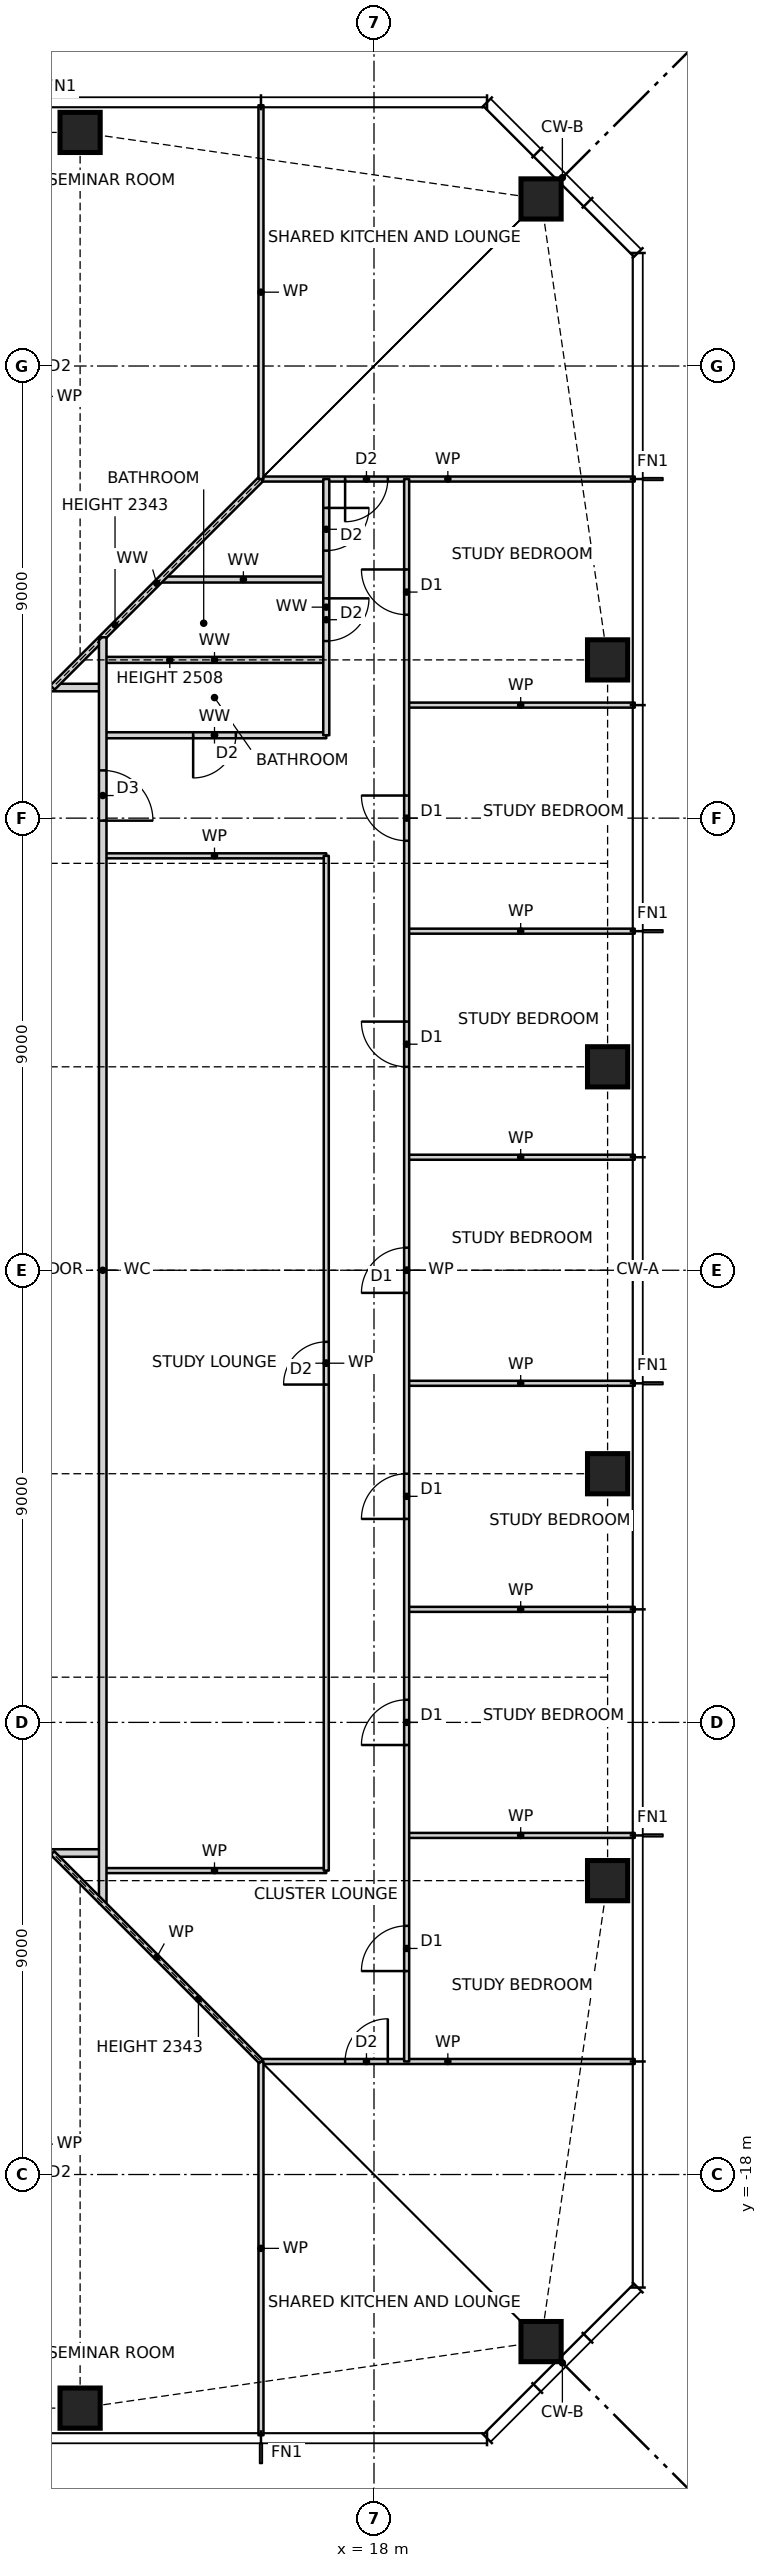
"""IFC4 building model, lengths in metres.
Left out: names, types, materials, properties, quantities, classifications, styles, units other than length and angle.
Written with IfcOpenShell. Run it as: python <this file> out.ifc"""

import sys

from ifc_helpers import new_model, si_unit, direction, frame, frame_2d, origin, origin_2d, place, context, subcontext, project, spatial, rectangle, hollow_rectangle, extrude, element, fill, save


model = new_model("IFC4")
c1 = context("Model", 3, precision=1e-05, world=origin(), true_north=direction((0.0, 1.0)))
c2 = subcontext(c1, "Body", "Model", "MODEL_VIEW")
j1 = project(units=[si_unit("LENGTHUNIT", "METRE"), si_unit("PLANEANGLEUNIT", "RADIAN")], contexts=[c1])
p1 = place(None, origin())
s1 = spatial("IfcSite", under=j1, at=p1, CompositionType="ELEMENT")
p2 = place(p1, origin())
s2 = spatial("IfcBuilding", under=s1, at=p2, CompositionType="ELEMENT")
p3 = place(p2, frame((0.0, 0.0, 29.0)))
s3 = spatial("IfcBuildingStorey", under=s2, at=p3, CompositionType="ELEMENT", Elevation=29.0)
for number, where, z_axis, x_axis in (
    (1, (12.15, -22.65, 0.0), (0.0, 0.0, 1.0), (1.0, 0.0, 0.0)),
    (2, (21.326, -21.326, 0.0), (0.0, 0.0, 1.0), (1.0, 0.0, 0.0)),
    (3, (22.65, -12.15, 0.0), (0.0, 0.0, 1.0), (1.0, 0.0, 0.0)),
    (4, (22.65, -4.05, 0.0), (0.0, 0.0, 1.0), (1.0, 0.0, 0.0)),
    (5, (22.65, 4.05, 0.0), (0.0, 0.0, 1.0), (1.0, 0.0, 0.0)),
    (6, (22.65, 12.15, 0.0), (0.0, 0.0, 1.0), (1.0, 0.0, 0.0)),
    (7, (21.326, 21.326, 0.0), (0.0, 0.0, 1.0), (1.0, 0.0, 0.0)),
    (8, (12.15, 22.65, 0.0), (0.0, 0.0, 1.0), (1.0, 0.0, 0.0)),
):
    element("IfcColumn", number, at=place(p3, frame(where, z_axis=z_axis, x_axis=x_axis)), inside=s3, PredefinedType="COLUMN", context=c2, shape_type="SweptSolid", body=[
        extrude(hollow_rectangle(XDim=0.8, YDim=0.8, WallThickness=0.09, at=origin_2d()), origin(), (0.0, 0.0, 1.0), 3.5),
    ])
p4 = place(p3, frame((15.75, -15.75, 0.0), z_axis=(0.0, 0.0, 1.0), x_axis=(1.0, 0.0, 0.0)))
e9 = element("IfcWall", 9, at=p4, inside=s3, PredefinedType="PARTITIONING", context=c2, shape_type="SweptSolid", body=[
    extrude(rectangle(XDim=7.44, YDim=0.1, at=frame_2d((3.72, 0.0))), origin(), (0.0, 0.0, 1.0), 3.27),
])
p5 = place(p4, frame((1.675, 0.0, 0.0)))
e10 = element("IfcOpeningElement", 10, at=p5, cuts=e9, PredefinedType="OPENING", context=c2, shape_type="SweptSolid", body=[
    extrude(rectangle(XDim=0.85, YDim=2.1, at=frame_2d((0.425, 1.05))), frame((0.0, 0.06, 0.0), z_axis=(0.0, -1.0, 0.0), x_axis=(1.0, 0.0, 0.0)), (0.0, 0.0, 1.0), 0.12),
])
p6 = place(p3, frame((12.6, -11.95, 0.0), z_axis=(0.0, 0.0, 1.0), x_axis=(1.0, 0.0, 0.0)))
e11 = element("IfcWall", 11, at=p6, inside=s3, PredefinedType="PARTITIONING", context=c2, shape_type="SweptSolid", body=[
    extrude(rectangle(XDim=4.45, YDim=0.1, at=frame_2d((2.225, 0.0))), origin(), (0.0, 0.0, 1.0), 3.27),
])
p7 = place(p3, frame((-11.6, -11.6, 0.0), z_axis=(0.0, 0.0, 1.0), x_axis=(1.0, 0.0, 0.0)))
e12 = element("IfcWall", 12, at=p7, inside=s3, PredefinedType="PARTITIONING", context=c2, shape_type="SweptSolid", body=[
    extrude(rectangle(XDim=24.2, YDim=0.15, at=frame_2d((12.1, 0.0))), origin(), (0.0, 0.0, 1.0), 3.27),
])
p8 = place(p7, frame((16.05, 0.0, 0.0)))
e13 = element("IfcOpeningElement", 13, at=p8, cuts=e12, PredefinedType="OPENING", context=c2, shape_type="SweptSolid", body=[
    extrude(rectangle(XDim=1.0, YDim=2.1, at=frame_2d((0.5, 1.05))), frame((0.0, 0.085, 0.0), z_axis=(0.0, -1.0, 0.0), x_axis=(1.0, 0.0, 0.0)), (0.0, 0.0, 1.0), 0.17),
])
for number, where, z_axis, x_axis in (
    (14, (18.65, -11.25, 0.0), (0.0, 0.0, 1.0), (1.0, 0.0, 0.0)),
    (15, (18.65, -6.75, 0.0), (0.0, 0.0, 1.0), (1.0, 0.0, 0.0)),
    (16, (18.65, -2.25, 0.0), (0.0, 0.0, 1.0), (1.0, 0.0, 0.0)),
    (17, (18.65, 2.25, 0.0), (0.0, 0.0, 1.0), (1.0, 0.0, 0.0)),
    (18, (18.65, 6.75, 0.0), (0.0, 0.0, 1.0), (1.0, 0.0, 0.0)),
):
    element("IfcWall", number, at=place(p3, frame(where, z_axis=z_axis, x_axis=x_axis)), inside=s3, PredefinedType="PARTITIONING", context=c2, shape_type="SweptSolid", body=[
        extrude(rectangle(XDim=4.54, YDim=0.1, at=frame_2d((2.27, 0.0))), origin(), (0.0, 0.0, 1.0), 3.27),
    ])
p9 = place(p3, frame((12.6, 8.25, 0.0), z_axis=(0.0, 0.0, 1.0), x_axis=(1.0, 0.0, 0.0)))
e19 = element("IfcWall", 19, at=p9, inside=s3, PredefinedType="PARTITIONING", context=c2, shape_type="SweptSolid", body=[
    extrude(rectangle(XDim=4.45, YDim=0.1, at=frame_2d((2.225, 0.0))), origin(), (0.0, 0.0, 1.0), 3.27),
])
p10 = place(p3, frame((12.6, 10.65, 0.0), z_axis=(0.0, 0.0, 1.0), x_axis=(1.0, 0.0, 0.0)))
e20 = element("IfcWall", 20, at=p10, inside=s3, PredefinedType="PARTITIONING", context=c2, shape_type="SweptSolid", body=[
    extrude(rectangle(XDim=4.45, YDim=0.12, at=frame_2d((2.225, 0.0))), origin(), (0.0, 0.0, 1.0), 3.27),
])
p11 = place(p10, frame((1.8, 0.0, 0.0)))
e21 = element("IfcOpeningElement", 21, at=p11, cuts=e20, PredefinedType="OPENING", context=c2, shape_type="SweptSolid", body=[
    extrude(rectangle(XDim=0.85, YDim=2.1, at=frame_2d((0.425, 1.05))), frame((0.0, 0.07, 0.0), z_axis=(0.0, -1.0, 0.0), x_axis=(1.0, 0.0, 0.0)), (0.0, 0.0, 1.0), 0.14),
])
p12 = place(p3, frame((18.65, 11.25, 0.0), z_axis=(0.0, 0.0, 1.0), x_axis=(1.0, 0.0, 0.0)))
e22 = element("IfcWall", 22, at=p12, inside=s3, PredefinedType="PARTITIONING", context=c2, shape_type="SweptSolid", body=[
    extrude(rectangle(XDim=4.54, YDim=0.1, at=frame_2d((2.27, 0.0))), origin(), (0.0, 0.0, 1.0), 3.27),
])
p13 = place(p3, frame((-11.6, 11.6, 0.0), z_axis=(0.0, 0.0, 1.0), x_axis=(1.0, 0.0, 0.0)))
e23 = element("IfcWall", 23, at=p13, inside=s3, PredefinedType="PARTITIONING", context=c2, shape_type="SweptSolid", body=[
    extrude(rectangle(XDim=24.2, YDim=0.15, at=frame_2d((12.1, 0.0))), origin(), (0.0, 0.0, 1.0), 3.27),
])
p14 = place(p13, frame((12.855, 0.0, 0.0)))
e24 = element("IfcOpeningElement", 24, at=p14, cuts=e23, PredefinedType="OPENING", context=c2, shape_type="SweptSolid", body=[
    extrude(rectangle(XDim=1.0, YDim=2.1, at=frame_2d((0.5, 1.05))), frame((0.0, 0.085, 0.0), z_axis=(0.0, -1.0, 0.0), x_axis=(1.0, 0.0, 0.0)), (0.0, 0.0, 1.0), 0.17),
])
p15 = place(p3, frame((12.6, 12.15, 0.0), z_axis=(0.0, 0.0, 1.0), x_axis=(1.0, 0.0, 0.0)))
e25 = element("IfcWall", 25, at=p15, inside=s3, PredefinedType="PARTITIONING", context=c2, shape_type="SweptSolid", body=[
    extrude(rectangle(XDim=4.45, YDim=0.12, at=frame_2d((2.225, 0.0))), origin(), (0.0, 0.0, 1.0), 2.508),
])
p16 = place(p3, frame((13.75, 13.75, 0.0), z_axis=(0.0, 0.0, 1.0), x_axis=(1.0, 0.0, 0.0)))
e26 = element("IfcWall", 26, at=p16, inside=s3, PredefinedType="PARTITIONING", context=c2, shape_type="SweptSolid", body=[
    extrude(rectangle(XDim=3.3, YDim=0.12, at=frame_2d((1.65, 0.0))), origin(), (0.0, 0.0, 1.0), 3.27),
])
p17 = place(p3, frame((15.75, 15.75, 0.0), z_axis=(0.0, 0.0, 1.0), x_axis=(1.0, 0.0, 0.0)))
e27 = element("IfcWall", 27, at=p17, inside=s3, PredefinedType="PARTITIONING", context=c2, shape_type="SweptSolid", body=[
    extrude(rectangle(XDim=7.44, YDim=0.1, at=frame_2d((3.72, 0.0))), origin(), (0.0, 0.0, 1.0), 3.27),
])
p18 = place(p17, frame((1.675, 0.0, 0.0)))
e28 = element("IfcOpeningElement", 28, at=p18, cuts=e27, PredefinedType="OPENING", context=c2, shape_type="SweptSolid", body=[
    extrude(rectangle(XDim=0.85, YDim=2.1, at=frame_2d((0.425, 1.05))), frame((0.0, 0.06, 0.0), z_axis=(0.0, -1.0, 0.0), x_axis=(1.0, 0.0, 0.0)), (0.0, 0.0, 1.0), 0.12),
])
p19 = place(p3, frame((11.6, 11.6, 0.0), z_axis=(0.0, 0.0, 1.0), x_axis=(0.707106781187, 0.707106781187, 0.0)))
e29 = element("IfcWall", 29, at=p19, inside=s3, PredefinedType="PARTITIONING", context=c2, shape_type="SweptSolid", body=[
    extrude(rectangle(XDim=5.869, YDim=0.12, at=frame_2d((2.935, 0.0))), origin(), (0.0, 0.0, 1.0), 2.343),
])
p20 = place(p3, frame((18.65, -15.75, 0.0), z_axis=(0.0, 0.0, 1.0), x_axis=(0.0, 1.0, 0.0)))
e30 = element("IfcWall", 30, at=p20, inside=s3, PredefinedType="PARTITIONING", context=c2, shape_type="SweptSolid", body=[
    extrude(rectangle(XDim=31.5, YDim=0.1, at=frame_2d((15.75, 0.0))), origin(), (0.0, 0.0, 1.0), 3.27),
])
p21 = place(p20, frame((1.8, 0.0, 0.0)))
e31 = element("IfcOpeningElement", 31, at=p21, cuts=e30, PredefinedType="OPENING", context=c2, shape_type="SweptSolid", body=[
    extrude(rectangle(XDim=0.9, YDim=2.1, at=frame_2d((0.45, 1.05))), frame((0.0, 0.06, 0.0), z_axis=(0.0, -1.0, 0.0), x_axis=(1.0, 0.0, 0.0)), (0.0, 0.0, 1.0), 0.12),
])
p22 = place(p20, frame((6.3, 0.0, 0.0)))
e32 = element("IfcOpeningElement", 32, at=p22, cuts=e30, PredefinedType="OPENING", context=c2, shape_type="SweptSolid", body=[
    extrude(rectangle(XDim=0.9, YDim=2.1, at=frame_2d((0.45, 1.05))), frame((0.0, 0.06, 0.0), z_axis=(0.0, -1.0, 0.0), x_axis=(1.0, 0.0, 0.0)), (0.0, 0.0, 1.0), 0.12),
])
p23 = place(p20, frame((10.8, 0.0, 0.0)))
e33 = element("IfcOpeningElement", 33, at=p23, cuts=e30, PredefinedType="OPENING", context=c2, shape_type="SweptSolid", body=[
    extrude(rectangle(XDim=0.9, YDim=2.1, at=frame_2d((0.45, 1.05))), frame((0.0, 0.06, 0.0), z_axis=(0.0, -1.0, 0.0), x_axis=(1.0, 0.0, 0.0)), (0.0, 0.0, 1.0), 0.12),
])
p24 = place(p20, frame((15.3, 0.0, 0.0)))
e34 = element("IfcOpeningElement", 34, at=p24, cuts=e30, PredefinedType="OPENING", context=c2, shape_type="SweptSolid", body=[
    extrude(rectangle(XDim=0.9, YDim=2.1, at=frame_2d((0.45, 1.05))), frame((0.0, 0.06, 0.0), z_axis=(0.0, -1.0, 0.0), x_axis=(1.0, 0.0, 0.0)), (0.0, 0.0, 1.0), 0.12),
])
p25 = place(p20, frame((19.8, 0.0, 0.0)))
e35 = element("IfcOpeningElement", 35, at=p25, cuts=e30, PredefinedType="OPENING", context=c2, shape_type="SweptSolid", body=[
    extrude(rectangle(XDim=0.9, YDim=2.1, at=frame_2d((0.45, 1.05))), frame((0.0, 0.06, 0.0), z_axis=(0.0, -1.0, 0.0), x_axis=(1.0, 0.0, 0.0)), (0.0, 0.0, 1.0), 0.12),
])
p26 = place(p20, frame((24.3, 0.0, 0.0)))
e36 = element("IfcOpeningElement", 36, at=p26, cuts=e30, PredefinedType="OPENING", context=c2, shape_type="SweptSolid", body=[
    extrude(rectangle(XDim=0.9, YDim=2.1, at=frame_2d((0.45, 1.05))), frame((0.0, 0.06, 0.0), z_axis=(0.0, -1.0, 0.0), x_axis=(1.0, 0.0, 0.0)), (0.0, 0.0, 1.0), 0.12),
])
p27 = place(p20, frame((28.8, 0.0, 0.0)))
e37 = element("IfcOpeningElement", 37, at=p27, cuts=e30, PredefinedType="OPENING", context=c2, shape_type="SweptSolid", body=[
    extrude(rectangle(XDim=0.9, YDim=2.1, at=frame_2d((0.45, 1.05))), frame((0.0, 0.06, 0.0), z_axis=(0.0, -1.0, 0.0), x_axis=(1.0, 0.0, 0.0)), (0.0, 0.0, 1.0), 0.12),
])
p28 = place(p3, frame((17.05, -11.95, 0.0), z_axis=(0.0, 0.0, 1.0), x_axis=(0.0, 1.0, 0.0)))
e38 = element("IfcWall", 38, at=p28, inside=s3, PredefinedType="PARTITIONING", context=c2, shape_type="SweptSolid", body=[
    extrude(rectangle(XDim=20.2, YDim=0.1, at=frame_2d((10.1, 0.0))), origin(), (0.0, 0.0, 1.0), 3.27),
])
p29 = place(p28, frame((9.675, 0.0, 0.0)))
e39 = element("IfcOpeningElement", 39, at=p29, cuts=e38, PredefinedType="OPENING", context=c2, shape_type="SweptSolid", body=[
    extrude(rectangle(XDim=0.85, YDim=2.1, at=frame_2d((0.425, 1.05))), frame((0.0, 0.06, 0.0), z_axis=(0.0, -1.0, 0.0), x_axis=(1.0, 0.0, 0.0)), (0.0, 0.0, 1.0), 0.12),
])
p30 = place(p3, frame((17.05, 10.65, 0.0), z_axis=(0.0, 0.0, 1.0), x_axis=(0.0, 1.0, 0.0)))
e40 = element("IfcWall", 40, at=p30, inside=s3, PredefinedType="PARTITIONING", context=c2, shape_type="SweptSolid", body=[
    extrude(rectangle(XDim=5.1, YDim=0.12, at=frame_2d((2.55, 0.0))), origin(), (0.0, 0.0, 1.0), 3.27),
])
p31 = place(p30, frame((1.875, 0.0, 0.0)))
e41 = element("IfcOpeningElement", 41, at=p31, cuts=e40, PredefinedType="OPENING", context=c2, shape_type="SweptSolid", body=[
    extrude(rectangle(XDim=0.85, YDim=2.1, at=frame_2d((0.425, 1.05))), frame((0.0, 0.07, 0.0), z_axis=(0.0, -1.0, 0.0), x_axis=(1.0, 0.0, 0.0)), (0.0, 0.0, 1.0), 0.14),
])
p32 = place(p30, frame((3.675, 0.0, 0.0)))
e42 = element("IfcOpeningElement", 42, at=p32, cuts=e40, PredefinedType="OPENING", context=c2, shape_type="SweptSolid", body=[
    extrude(rectangle(XDim=0.85, YDim=2.1, at=frame_2d((0.425, 1.05))), frame((0.0, 0.07, 0.0), z_axis=(0.0, -1.0, 0.0), x_axis=(1.0, 0.0, 0.0)), (0.0, 0.0, 1.0), 0.14),
])
for number, where, z_axis, x_axis in (
    (43, (15.75, -23.19, 0.0), (0.0, 0.0, 1.0), (0.0, 1.0, 0.0)),
    (44, (15.75, 15.75, 0.0), (0.0, 0.0, 1.0), (0.0, 1.0, 0.0)),
):
    element("IfcWall", number, at=place(p3, frame(where, z_axis=z_axis, x_axis=x_axis)), inside=s3, PredefinedType="PARTITIONING", context=c2, shape_type="SweptSolid", body=[
        extrude(rectangle(XDim=7.44, YDim=0.1, at=frame_2d((3.72, 0.0))), origin(), (0.0, 0.0, 1.0), 3.27),
    ])
p33 = place(p3, frame((12.6, -12.6, 0.0), z_axis=(0.0, 0.0, 1.0), x_axis=(0.0, 1.0, 0.0)))
e45 = element("IfcWall", 45, at=p33, inside=s3, PredefinedType="PARTITIONING", context=c2, shape_type="SweptSolid", body=[
    extrude(rectangle(XDim=25.2, YDim=0.15, at=frame_2d((12.6, 0.0))), origin(), (0.0, 0.0, 1.0), 3.27),
])
p34 = place(p33, frame((21.55, 0.0, 0.0)))
e46 = element("IfcOpeningElement", 46, at=p34, cuts=e45, PredefinedType="OPENING", context=c2, shape_type="SweptSolid", body=[
    extrude(rectangle(XDim=1.0, YDim=2.1, at=frame_2d((0.5, 1.05))), frame((0.0, 0.085, 0.0), z_axis=(0.0, -1.0, 0.0), x_axis=(1.0, 0.0, 0.0)), (0.0, 0.0, 1.0), 0.17),
])
p35 = place(p3, frame((15.75, -15.75, 0.0), z_axis=(0.0, 0.0, 1.0), x_axis=(-0.707106781187, 0.707106781187, 0.0)))
e47 = element("IfcWall", 47, at=p35, inside=s3, PredefinedType="PARTITIONING", context=c2, shape_type="SweptSolid", body=[
    extrude(rectangle(XDim=5.869, YDim=0.1, at=frame_2d((2.935, 0.0))), origin(), (0.0, 0.0, 1.0), 2.343),
])
p36 = place(p21, origin())
e48 = element("IfcDoor", 48, at=p36, inside=s3, OperationType="SINGLE_SWING_LEFT", PredefinedType="DOOR", context=c2, shape_type="SweptSolid", body=[
    extrude(rectangle(XDim=0.9, YDim=2.1, at=frame_2d((0.45, 1.05))), frame((0.0, 0.025, 0.0), z_axis=(0.0, -1.0, 0.0), x_axis=(1.0, 0.0, 0.0)), (0.0, 0.0, 1.0), 0.05),
])
fill(e31, e48)
p37 = place(p22, origin())
e49 = element("IfcDoor", 49, at=p37, inside=s3, OperationType="SINGLE_SWING_LEFT", PredefinedType="DOOR", context=c2, shape_type="SweptSolid", body=[
    extrude(rectangle(XDim=0.9, YDim=2.1, at=frame_2d((0.45, 1.05))), frame((0.0, 0.025, 0.0), z_axis=(0.0, -1.0, 0.0), x_axis=(1.0, 0.0, 0.0)), (0.0, 0.0, 1.0), 0.05),
])
fill(e32, e49)
p38 = place(p23, origin())
e50 = element("IfcDoor", 50, at=p38, inside=s3, OperationType="SINGLE_SWING_LEFT", PredefinedType="DOOR", context=c2, shape_type="SweptSolid", body=[
    extrude(rectangle(XDim=0.9, YDim=2.1, at=frame_2d((0.45, 1.05))), frame((0.0, 0.025, 0.0), z_axis=(0.0, -1.0, 0.0), x_axis=(1.0, 0.0, 0.0)), (0.0, 0.0, 1.0), 0.05),
])
fill(e33, e50)
p39 = place(p24, origin())
e51 = element("IfcDoor", 51, at=p39, inside=s3, OperationType="SINGLE_SWING_LEFT", PredefinedType="DOOR", context=c2, shape_type="SweptSolid", body=[
    extrude(rectangle(XDim=0.9, YDim=2.1, at=frame_2d((0.45, 1.05))), frame((0.0, 0.025, 0.0), z_axis=(0.0, -1.0, 0.0), x_axis=(1.0, 0.0, 0.0)), (0.0, 0.0, 1.0), 0.05),
])
fill(e34, e51)
p40 = place(p25, origin())
e52 = element("IfcDoor", 52, at=p40, inside=s3, OperationType="SINGLE_SWING_RIGHT", PredefinedType="DOOR", context=c2, shape_type="SweptSolid", body=[
    extrude(rectangle(XDim=0.9, YDim=2.1, at=frame_2d((0.45, 1.05))), frame((0.0, 0.025, 0.0), z_axis=(0.0, -1.0, 0.0), x_axis=(1.0, 0.0, 0.0)), (0.0, 0.0, 1.0), 0.05),
])
fill(e35, e52)
p41 = place(p26, origin())
e53 = element("IfcDoor", 53, at=p41, inside=s3, OperationType="SINGLE_SWING_RIGHT", PredefinedType="DOOR", context=c2, shape_type="SweptSolid", body=[
    extrude(rectangle(XDim=0.9, YDim=2.1, at=frame_2d((0.45, 1.05))), frame((0.0, 0.025, 0.0), z_axis=(0.0, -1.0, 0.0), x_axis=(1.0, 0.0, 0.0)), (0.0, 0.0, 1.0), 0.05),
])
fill(e36, e53)
p42 = place(p27, origin())
e54 = element("IfcDoor", 54, at=p42, inside=s3, OperationType="SINGLE_SWING_RIGHT", PredefinedType="DOOR", context=c2, shape_type="SweptSolid", body=[
    extrude(rectangle(XDim=0.9, YDim=2.1, at=frame_2d((0.45, 1.05))), frame((0.0, 0.025, 0.0), z_axis=(0.0, -1.0, 0.0), x_axis=(1.0, 0.0, 0.0)), (0.0, 0.0, 1.0), 0.05),
])
fill(e37, e54)
p43 = place(p34, frame((1.0, 0.0, 0.0), z_axis=(0.0, 0.0, 1.0), x_axis=(-1.0, 0.0, 0.0)))
e55 = element("IfcDoor", 55, at=p43, inside=s3, OperationType="SINGLE_SWING_RIGHT", PredefinedType="DOOR", context=c2, shape_type="SweptSolid", body=[
    extrude(rectangle(XDim=1.0, YDim=2.1, at=frame_2d((0.5, 1.05))), frame((0.0, 0.025, 0.0), z_axis=(0.0, -1.0, 0.0), x_axis=(1.0, 0.0, 0.0)), (0.0, 0.0, 1.0), 0.05),
])
fill(e46, e55)
p44 = place(p29, origin())
e56 = element("IfcDoor", 56, at=p44, inside=s3, OperationType="SINGLE_SWING_LEFT", PredefinedType="DOOR", context=c2, shape_type="SweptSolid", body=[
    extrude(rectangle(XDim=0.85, YDim=2.1, at=frame_2d((0.425, 1.05))), frame((0.0, 0.025, 0.0), z_axis=(0.0, -1.0, 0.0), x_axis=(1.0, 0.0, 0.0)), (0.0, 0.0, 1.0), 0.05),
])
fill(e39, e56)
p45 = place(p11, frame((0.85, 0.0, 0.0), z_axis=(0.0, 0.0, 1.0), x_axis=(-1.0, 0.0, 0.0)))
e57 = element("IfcDoor", 57, at=p45, inside=s3, OperationType="SINGLE_SWING_RIGHT", PredefinedType="DOOR", context=c2, shape_type="SweptSolid", body=[
    extrude(rectangle(XDim=0.85, YDim=2.1, at=frame_2d((0.425, 1.05))), frame((0.0, 0.025, 0.0), z_axis=(0.0, -1.0, 0.0), x_axis=(1.0, 0.0, 0.0)), (0.0, 0.0, 1.0), 0.05),
])
fill(e21, e57)
p46 = place(p31, frame((0.85, 0.0, 0.0), z_axis=(0.0, 0.0, 1.0), x_axis=(-1.0, 0.0, 0.0)))
e58 = element("IfcDoor", 58, at=p46, inside=s3, OperationType="SINGLE_SWING_LEFT", PredefinedType="DOOR", context=c2, shape_type="SweptSolid", body=[
    extrude(rectangle(XDim=0.85, YDim=2.1, at=frame_2d((0.425, 1.05))), frame((0.0, 0.025, 0.0), z_axis=(0.0, -1.0, 0.0), x_axis=(1.0, 0.0, 0.0)), (0.0, 0.0, 1.0), 0.05),
])
fill(e41, e58)
p47 = place(p32, frame((0.85, 0.0, 0.0), z_axis=(0.0, 0.0, 1.0), x_axis=(-1.0, 0.0, 0.0)))
e59 = element("IfcDoor", 59, at=p47, inside=s3, OperationType="SINGLE_SWING_LEFT", PredefinedType="DOOR", context=c2, shape_type="SweptSolid", body=[
    extrude(rectangle(XDim=0.85, YDim=2.1, at=frame_2d((0.425, 1.05))), frame((0.0, 0.025, 0.0), z_axis=(0.0, -1.0, 0.0), x_axis=(1.0, 0.0, 0.0)), (0.0, 0.0, 1.0), 0.05),
])
fill(e42, e59)
p48 = place(p5, origin())
e60 = element("IfcDoor", 60, at=p48, inside=s3, OperationType="SINGLE_SWING_RIGHT", PredefinedType="DOOR", context=c2, shape_type="SweptSolid", body=[
    extrude(rectangle(XDim=0.85, YDim=2.1, at=frame_2d((0.425, 1.05))), frame((0.0, 0.025, 0.0), z_axis=(0.0, -1.0, 0.0), x_axis=(1.0, 0.0, 0.0)), (0.0, 0.0, 1.0), 0.05),
])
fill(e10, e60)
p49 = place(p18, frame((0.85, 0.0, 0.0), z_axis=(0.0, 0.0, 1.0), x_axis=(-1.0, 0.0, 0.0)))
e61 = element("IfcDoor", 61, at=p49, inside=s3, OperationType="SINGLE_SWING_RIGHT", PredefinedType="DOOR", context=c2, shape_type="SweptSolid", body=[
    extrude(rectangle(XDim=0.85, YDim=2.1, at=frame_2d((0.425, 1.05))), frame((0.0, 0.025, 0.0), z_axis=(0.0, -1.0, 0.0), x_axis=(1.0, 0.0, 0.0)), (0.0, 0.0, 1.0), 0.05),
])
fill(e28, e61)
save(model, sys.argv[1])
